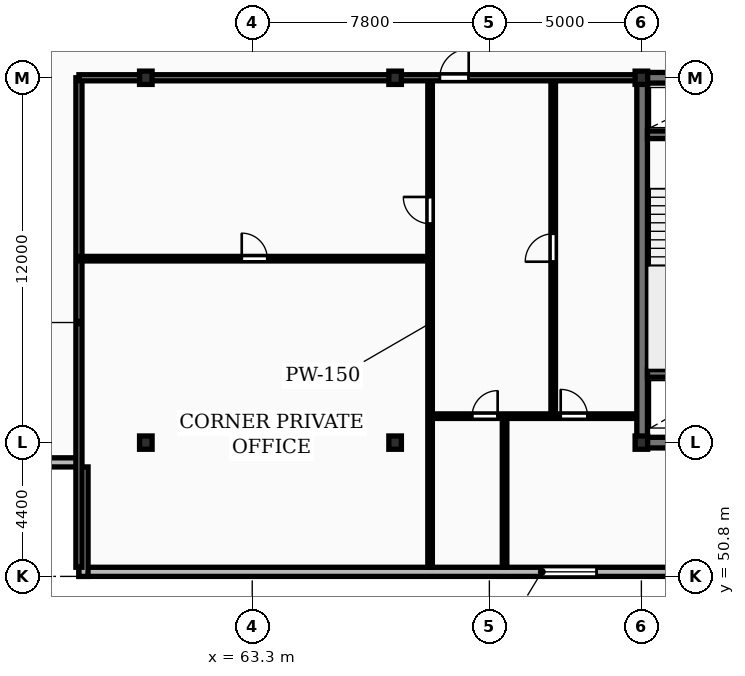
"""IFC4 building model, lengths in metres.
Left out: names, types, materials, properties, quantities, classifications, styles, units other than length and angle.
Written with IfcOpenShell. Run it as: python <this file> out.ifc"""

import sys

from ifc_helpers import new_model, si_unit, direction, frame, frame_2d, origin, origin_2d, place, context, subcontext, project, spatial, rectangle, i_section, extrude, element, fill, save


model = new_model("IFC4")
c1 = context("Model", 3, precision=1e-05, world=origin(), true_north=direction((0.0, 1.0)))
c2 = subcontext(c1, "Body", "Model", "MODEL_VIEW")
j1 = project(units=[si_unit("LENGTHUNIT", "METRE"), si_unit("PLANEANGLEUNIT", "RADIAN")], contexts=[c1])
p1 = place(None, origin())
s1 = spatial("IfcSite", under=j1, at=p1, CompositionType="ELEMENT")
p2 = place(p1, origin())
s2 = spatial("IfcBuilding", under=s1, at=p2, CompositionType="ELEMENT")
p3 = place(p2, frame((0.0, 0.0, 142.9)))
s3 = spatial("IfcBuildingStorey", under=s2, at=p3, CompositionType="ELEMENT", Elevation=142.9)
for number, where, z_axis, x_axis in (
    (1, (59.8, 55.2, 0.0), (0.0, 0.0, 1.0), (1.0, 0.0, 0.0)),
    (2, (59.8, 67.2, 0.0), (0.0, 0.0, 1.0), (1.0, 0.0, 0.0)),
    (3, (68.0, 55.2, 0.0), (0.0, 0.0, 1.0), (1.0, 0.0, 0.0)),
    (4, (68.0, 67.2, 0.0), (0.0, 0.0, 1.0), (1.0, 0.0, 0.0)),
    (5, (76.1, 55.2, 0.0), (0.0, 0.0, 1.0), (1.0, 0.0, 0.0)),
    (6, (76.1, 67.2, 0.0), (0.0, 0.0, 1.0), (1.0, 0.0, 0.0)),
):
    element("IfcColumn", number, at=place(p3, frame(where, z_axis=z_axis, x_axis=x_axis)), inside=s3, PredefinedType="COLUMN", context=c2, shape_type="SweptSolid", body=[
        extrude(i_section(OverallWidth=0.412, OverallDepth=0.437, WebThickness=0.036, FlangeThickness=0.052, FilletRadius=0.015, at=origin_2d()), origin(), (0.0, 0.0, 1.0), 3.6),
    ])
p4 = place(p3, frame((57.6, 50.95, 0.0), z_axis=(0.0, 0.0, 1.0), x_axis=(1.0, 0.0, 0.0)))
e7 = element("IfcWall", 7, at=p4, inside=s3, PredefinedType="STANDARD", context=c2, shape_type="SweptSolid", body=[
    extrude(rectangle(XDim=73.0, YDim=0.3, at=frame_2d((36.5, 0.0))), origin(), (0.0, 0.0, 1.0), 3.31),
])
p5 = place(p4, frame((15.225, 0.0, 0.85)))
e8 = element("IfcOpeningElement", 8, at=p5, cuts=e7, PredefinedType="OPENING", context=c2, shape_type="SweptSolid", body=[
    extrude(rectangle(XDim=1.8, YDim=1.8, at=frame_2d((0.9, 0.9))), frame((0.0, 0.16, 0.0), z_axis=(0.0, -1.0, 0.0), x_axis=(1.0, 0.0, 0.0)), (0.0, 0.0, 1.0), 0.32),
])
p6 = place(p4, frame((58.575, 0.0, 0.85)))
e9 = element("IfcOpeningElement", 9, at=p6, cuts=e7, PredefinedType="OPENING", context=c2, shape_type="SweptSolid", body=[
    extrude(rectangle(XDim=1.8, YDim=1.8, at=frame_2d((0.9, 0.9))), frame((0.0, 0.16, 0.0), z_axis=(0.0, -1.0, 0.0), x_axis=(1.0, 0.0, 0.0)), (0.0, 0.0, 1.0), 0.32),
])
p7 = place(p4, frame((33.45, 0.0, 0.0)))
e10 = element("IfcOpeningElement", 10, at=p7, cuts=e7, PredefinedType="OPENING", context=c2, shape_type="SweptSolid", body=[
    extrude(rectangle(XDim=1.1, YDim=2.1, at=frame_2d((0.55, 1.05))), frame((0.0, 0.16, 0.0), z_axis=(0.0, -1.0, 0.0), x_axis=(1.0, 0.0, 0.0)), (0.0, 0.0, 1.0), 0.32),
])
p8 = place(p3, frame((54.0, 54.55, 0.0), z_axis=(0.0, 0.0, 1.0), x_axis=(1.0, 0.0, 0.0)))
e11 = element("IfcWall", 11, at=p8, inside=s3, PredefinedType="STANDARD", context=c2, shape_type="SweptSolid", body=[
    extrude(rectangle(XDim=3.6, YDim=0.3, at=frame_2d((1.8, 0.0))), origin(), (0.0, 0.0, 1.0), 3.31),
])
p9 = place(p3, frame((57.75, 54.4, 0.0), z_axis=(0.0, 0.0, 1.0), x_axis=(0.0, -1.0, 0.0)))
e12 = element("IfcWall", 12, at=p9, inside=s3, PredefinedType="STANDARD", context=c2, shape_type="SweptSolid", body=[
    extrude(rectangle(XDim=3.6, YDim=0.3, at=frame_2d((1.8, 0.0))), origin(), (0.0, 0.0, 1.0), 3.31),
])
p10 = place(p3, frame((75.95, 55.2, 0.0), z_axis=(0.0, 0.0, 1.0), x_axis=(1.0, 0.0, 0.0)))
e13 = element("IfcWall", 13, at=p10, inside=s3, PredefinedType="SHEAR", context=c2, shape_type="SweptSolid", body=[
    extrude(rectangle(XDim=36.3, YDim=0.35, at=frame_2d((18.15, 0.0))), origin(), (0.0, 0.0, 1.0), 3.6),
])
p11 = place(p10, frame((15.1, 0.0, 0.0)))
e14 = element("IfcOpeningElement", 14, at=p11, cuts=e13, PredefinedType="OPENING", context=c2, shape_type="SweptSolid", body=[
    extrude(rectangle(XDim=1.1, YDim=2.1, at=frame_2d((0.55, 1.05))), frame((0.0, 0.185, 0.0), z_axis=(0.0, -1.0, 0.0), x_axis=(1.0, 0.0, 0.0)), (0.0, 0.0, 1.0), 0.37),
])
p12 = place(p3, frame((76.125, 55.375, 0.0), z_axis=(0.0, 0.0, 1.0), x_axis=(0.0, 1.0, 0.0)))
e15 = element("IfcWall", 15, at=p12, inside=s3, PredefinedType="SHEAR", context=c2, shape_type="SweptSolid", body=[
    extrude(rectangle(XDim=11.65, YDim=0.35, at=frame_2d((5.825, 0.0))), origin(), (0.0, 0.0, 1.0), 3.6),
])
p13 = place(p3, frame((75.95, 67.2, 0.0), z_axis=(0.0, 0.0, 1.0), x_axis=(1.0, 0.0, 0.0)))
e16 = element("IfcWall", 16, at=p13, inside=s3, PredefinedType="SHEAR", context=c2, shape_type="SweptSolid", body=[
    extrude(rectangle(XDim=36.3, YDim=0.35, at=frame_2d((18.15, 0.0))), origin(), (0.0, 0.0, 1.0), 3.6),
])
p14 = place(p13, frame((5.25, 0.0, 0.0)))
e17 = element("IfcOpeningElement", 17, at=p14, cuts=e16, PredefinedType="OPENING", context=c2, shape_type="SweptSolid", body=[
    extrude(rectangle(XDim=1.0, YDim=2.15, at=frame_2d((0.5, 1.075))), frame((0.0, 0.185, 0.0), z_axis=(0.0, -1.0, 0.0), x_axis=(1.0, 0.0, 0.0)), (0.0, 0.0, 1.0), 0.37),
])
p15 = place(p13, frame((21.6, 0.0, 0.0)))
e18 = element("IfcOpeningElement", 18, at=p15, cuts=e16, PredefinedType="OPENING", context=c2, shape_type="SweptSolid", body=[
    extrude(rectangle(XDim=1.5, YDim=2.2, at=frame_2d((0.75, 1.1))), frame((0.0, 0.185, 0.0), z_axis=(0.0, -1.0, 0.0), x_axis=(1.0, 0.0, 0.0)), (0.0, 0.0, 1.0), 0.37),
])
p16 = place(p13, frame((30.45, 0.0, 0.0)))
e19 = element("IfcOpeningElement", 19, at=p16, cuts=e16, PredefinedType="OPENING", context=c2, shape_type="SweptSolid", body=[
    extrude(rectangle(XDim=1.0, YDim=2.15, at=frame_2d((0.5, 1.075))), frame((0.0, 0.185, 0.0), z_axis=(0.0, -1.0, 0.0), x_axis=(1.0, 0.0, 0.0)), (0.0, 0.0, 1.0), 0.37),
])
for number, where, z_axis, x_axis in (
    (20, (76.3, 57.475, 0.0), (0.0, 0.0, 1.0), (1.0, 0.0, 0.0)),
    (21, (76.3, 65.325, 0.0), (0.0, 0.0, 1.0), (1.0, 0.0, 0.0)),
):
    element("IfcWall", number, at=place(p3, frame(where, z_axis=z_axis, x_axis=x_axis)), inside=s3, PredefinedType="SHEAR", context=c2, shape_type="SweptSolid", body=[
        extrude(rectangle(XDim=3.24, YDim=0.25, at=frame_2d((1.62, 0.0))), origin(), (0.0, 0.0, 1.0), 3.6),
    ])
p17 = place(p3, frame((57.6, 51.1, 0.0), z_axis=(0.0, 0.0, 1.0), x_axis=(0.0, 1.0, 0.0)))
e22 = element("IfcWall", 22, at=p17, inside=s3, PredefinedType="PARTITIONING", context=c2, shape_type="SweptSolid", body=[
    extrude(rectangle(XDim=16.1, YDim=0.2, at=frame_2d((8.05, 0.0))), origin(), (0.0, 0.0, 1.0), 3.31),
])
p18 = place(p3, frame((57.6, 61.25, 0.0), z_axis=(0.0, 0.0, 1.0), x_axis=(1.0, 0.0, 0.0)))
e23 = element("IfcWall", 23, at=p18, inside=s3, PredefinedType="PARTITIONING", context=c2, shape_type="SweptSolid", body=[
    extrude(rectangle(XDim=11.55, YDim=0.15, at=frame_2d((5.775, 0.0))), origin(), (0.0, 0.0, 1.0), 3.31),
])
p19 = place(p18, frame((5.355, 0.0, 0.0)))
e24 = element("IfcOpeningElement", 24, at=p19, cuts=e23, PredefinedType="OPENING", context=c2, shape_type="SweptSolid", body=[
    extrude(rectangle(XDim=0.84, YDim=2.04, at=frame_2d((0.42, 1.02))), frame((0.0, 0.085, 0.0), z_axis=(0.0, -1.0, 0.0), x_axis=(1.0, 0.0, 0.0)), (0.0, 0.0, 1.0), 0.17),
])
p20 = place(p3, frame((69.15, 51.1, 0.0), z_axis=(0.0, 0.0, 1.0), x_axis=(0.0, 1.0, 0.0)))
e25 = element("IfcWall", 25, at=p20, inside=s3, PredefinedType="PARTITIONING", context=c2, shape_type="SweptSolid", body=[
    extrude(rectangle(XDim=16.05, YDim=0.15, at=frame_2d((8.025, 0.0))), origin(), (0.0, 0.0, 1.0), 3.31),
])
p21 = place(p20, frame((11.3, 0.0, 0.0)))
e26 = element("IfcOpeningElement", 26, at=p21, cuts=e25, PredefinedType="OPENING", context=c2, shape_type="SweptSolid", body=[
    extrude(rectangle(XDim=0.88, YDim=2.06, at=frame_2d((0.44, 1.03))), frame((0.0, 0.085, 0.0), z_axis=(0.0, -1.0, 0.0), x_axis=(1.0, 0.0, 0.0)), (0.0, 0.0, 1.0), 0.17),
])
p22 = place(p3, frame((73.2, 56.07, 0.0), z_axis=(0.0, 0.0, 1.0), x_axis=(0.0, 1.0, 0.0)))
e27 = element("IfcWall", 27, at=p22, inside=s3, PredefinedType="PARTITIONING", context=c2, shape_type="SweptSolid", body=[
    extrude(rectangle(XDim=11.08, YDim=0.15, at=frame_2d((5.54, 0.0))), origin(), (0.0, 0.0, 1.0), 3.31),
])
p23 = place(p22, frame((5.08, 0.0, 0.0)))
e28 = element("IfcOpeningElement", 28, at=p23, cuts=e27, PredefinedType="OPENING", context=c2, shape_type="SweptSolid", body=[
    extrude(rectangle(XDim=0.92, YDim=2.08, at=frame_2d((0.46, 1.04))), frame((0.0, 0.085, 0.0), z_axis=(0.0, -1.0, 0.0), x_axis=(1.0, 0.0, 0.0)), (0.0, 0.0, 1.0), 0.17),
])
p24 = place(p3, frame((71.6, 51.1, 0.0), z_axis=(0.0, 0.0, 1.0), x_axis=(0.0, 1.0, 0.0)))
e29 = element("IfcWall", 29, at=p24, inside=s3, PredefinedType="PARTITIONING", context=c2, shape_type="SweptSolid", body=[
    extrude(rectangle(XDim=4.97, YDim=0.15, at=frame_2d((2.485, 0.0))), origin(), (0.0, 0.0, 1.0), 3.31),
])
p25 = place(p3, frame((69.17, 56.07, 0.0), z_axis=(0.0, 0.0, 1.0), x_axis=(1.0, 0.0, 0.0)))
e30 = element("IfcWall", 30, at=p25, inside=s3, PredefinedType="PARTITIONING", context=c2, shape_type="SweptSolid", body=[
    extrude(rectangle(XDim=6.76, YDim=0.15, at=frame_2d((3.38, 0.0))), origin(), (0.0, 0.0, 1.0), 3.31),
])
p26 = place(p25, frame((1.362, 0.0, 0.0)))
e31 = element("IfcOpeningElement", 31, at=p26, cuts=e30, PredefinedType="OPENING", context=c2, shape_type="SweptSolid", body=[
    extrude(rectangle(XDim=0.84, YDim=2.04, at=frame_2d((0.42, 1.02))), frame((0.0, 0.085, 0.0), z_axis=(0.0, -1.0, 0.0), x_axis=(1.0, 0.0, 0.0)), (0.0, 0.0, 1.0), 0.17),
])
p27 = place(p25, frame((4.277, 0.0, 0.0)))
e32 = element("IfcOpeningElement", 32, at=p27, cuts=e30, PredefinedType="OPENING", context=c2, shape_type="SweptSolid", body=[
    extrude(rectangle(XDim=0.88, YDim=2.06, at=frame_2d((0.44, 1.03))), frame((0.0, 0.085, 0.0), z_axis=(0.0, -1.0, 0.0), x_axis=(1.0, 0.0, 0.0)), (0.0, 0.0, 1.0), 0.17),
])
p28 = place(p3, frame((57.6, 67.2, 0.0), z_axis=(0.0, 0.0, 1.0), x_axis=(1.0, 0.0, 0.0)))
e33 = element("IfcWall", 33, at=p28, inside=s3, PredefinedType="PARTITIONING", context=c2, shape_type="SweptSolid", body=[
    extrude(rectangle(XDim=18.35, YDim=0.2, at=frame_2d((9.175, 0.0))), origin(), (0.0, 0.0, 1.0), 2.773),
])
p29 = place(p28, frame((11.87, 0.0, 0.0)))
e34 = element("IfcOpeningElement", 34, at=p29, cuts=e33, PredefinedType="OPENING", context=c2, shape_type="SweptSolid", body=[
    extrude(rectangle(XDim=0.95, YDim=2.15, at=frame_2d((0.475, 1.075))), frame((0.0, 0.11, 0.0), z_axis=(0.0, -1.0, 0.0), x_axis=(1.0, 0.0, 0.0)), (0.0, 0.0, 1.0), 0.22),
])
p30 = place(p5, origin())
e35 = element("IfcWindow", 35, at=p30, inside=s3, PartitioningType="SINGLE_PANEL", PredefinedType="WINDOW", context=c2, shape_type="SweptSolid", body=[
    extrude(rectangle(XDim=1.8, YDim=1.8, at=frame_2d((0.9, 0.9))), frame((0.0, 0.03, 0.0), z_axis=(0.0, -1.0, 0.0), x_axis=(1.0, 0.0, 0.0)), (0.0, 0.0, 1.0), 0.06),
])
fill(e8, e35)
p31 = place(p19, origin())
e36 = element("IfcDoor", 36, at=p31, inside=s3, OperationType="SINGLE_SWING_LEFT", PredefinedType="DOOR", context=c2, shape_type="SweptSolid", body=[
    extrude(rectangle(XDim=0.84, YDim=2.04, at=frame_2d((0.42, 1.02))), frame((0.0, 0.025, 0.0), z_axis=(0.0, -1.0, 0.0), x_axis=(1.0, 0.0, 0.0)), (0.0, 0.0, 1.0), 0.05),
])
fill(e24, e36)
p32 = place(p21, origin())
e37 = element("IfcDoor", 37, at=p32, inside=s3, OperationType="SINGLE_SWING_RIGHT", PredefinedType="DOOR", context=c2, shape_type="SweptSolid", body=[
    extrude(rectangle(XDim=0.88, YDim=2.06, at=frame_2d((0.44, 1.03))), frame((0.0, 0.025, 0.0), z_axis=(0.0, -1.0, 0.0), x_axis=(1.0, 0.0, 0.0)), (0.0, 0.0, 1.0), 0.05),
])
fill(e26, e37)
p33 = place(p23, origin())
e38 = element("IfcDoor", 38, at=p33, inside=s3, OperationType="SINGLE_SWING_LEFT", PredefinedType="DOOR", context=c2, shape_type="SweptSolid", body=[
    extrude(rectangle(XDim=0.92, YDim=2.08, at=frame_2d((0.46, 1.04))), frame((0.0, 0.025, 0.0), z_axis=(0.0, -1.0, 0.0), x_axis=(1.0, 0.0, 0.0)), (0.0, 0.0, 1.0), 0.05),
])
fill(e28, e38)
p34 = place(p26, origin())
e39 = element("IfcDoor", 39, at=p34, inside=s3, OperationType="SINGLE_SWING_RIGHT", PredefinedType="DOOR", context=c2, shape_type="SweptSolid", body=[
    extrude(rectangle(XDim=0.84, YDim=2.04, at=frame_2d((0.42, 1.02))), frame((0.0, 0.025, 0.0), z_axis=(0.0, -1.0, 0.0), x_axis=(1.0, 0.0, 0.0)), (0.0, 0.0, 1.0), 0.05),
])
fill(e31, e39)
p35 = place(p27, origin())
e40 = element("IfcDoor", 40, at=p35, inside=s3, OperationType="SINGLE_SWING_LEFT", PredefinedType="DOOR", context=c2, shape_type="SweptSolid", body=[
    extrude(rectangle(XDim=0.88, YDim=2.06, at=frame_2d((0.44, 1.03))), frame((0.0, 0.025, 0.0), z_axis=(0.0, -1.0, 0.0), x_axis=(1.0, 0.0, 0.0)), (0.0, 0.0, 1.0), 0.05),
])
fill(e32, e40)
p36 = place(p29, origin())
e41 = element("IfcDoor", 41, at=p36, inside=s3, OperationType="SINGLE_SWING_RIGHT", PredefinedType="DOOR", context=c2, shape_type="SweptSolid", body=[
    extrude(rectangle(XDim=0.95, YDim=2.15, at=frame_2d((0.475, 1.075))), frame((0.0, 0.025, 0.0), z_axis=(0.0, -1.0, 0.0), x_axis=(1.0, 0.0, 0.0)), (0.0, 0.0, 1.0), 0.05),
])
fill(e34, e41)
save(model, sys.argv[1])
